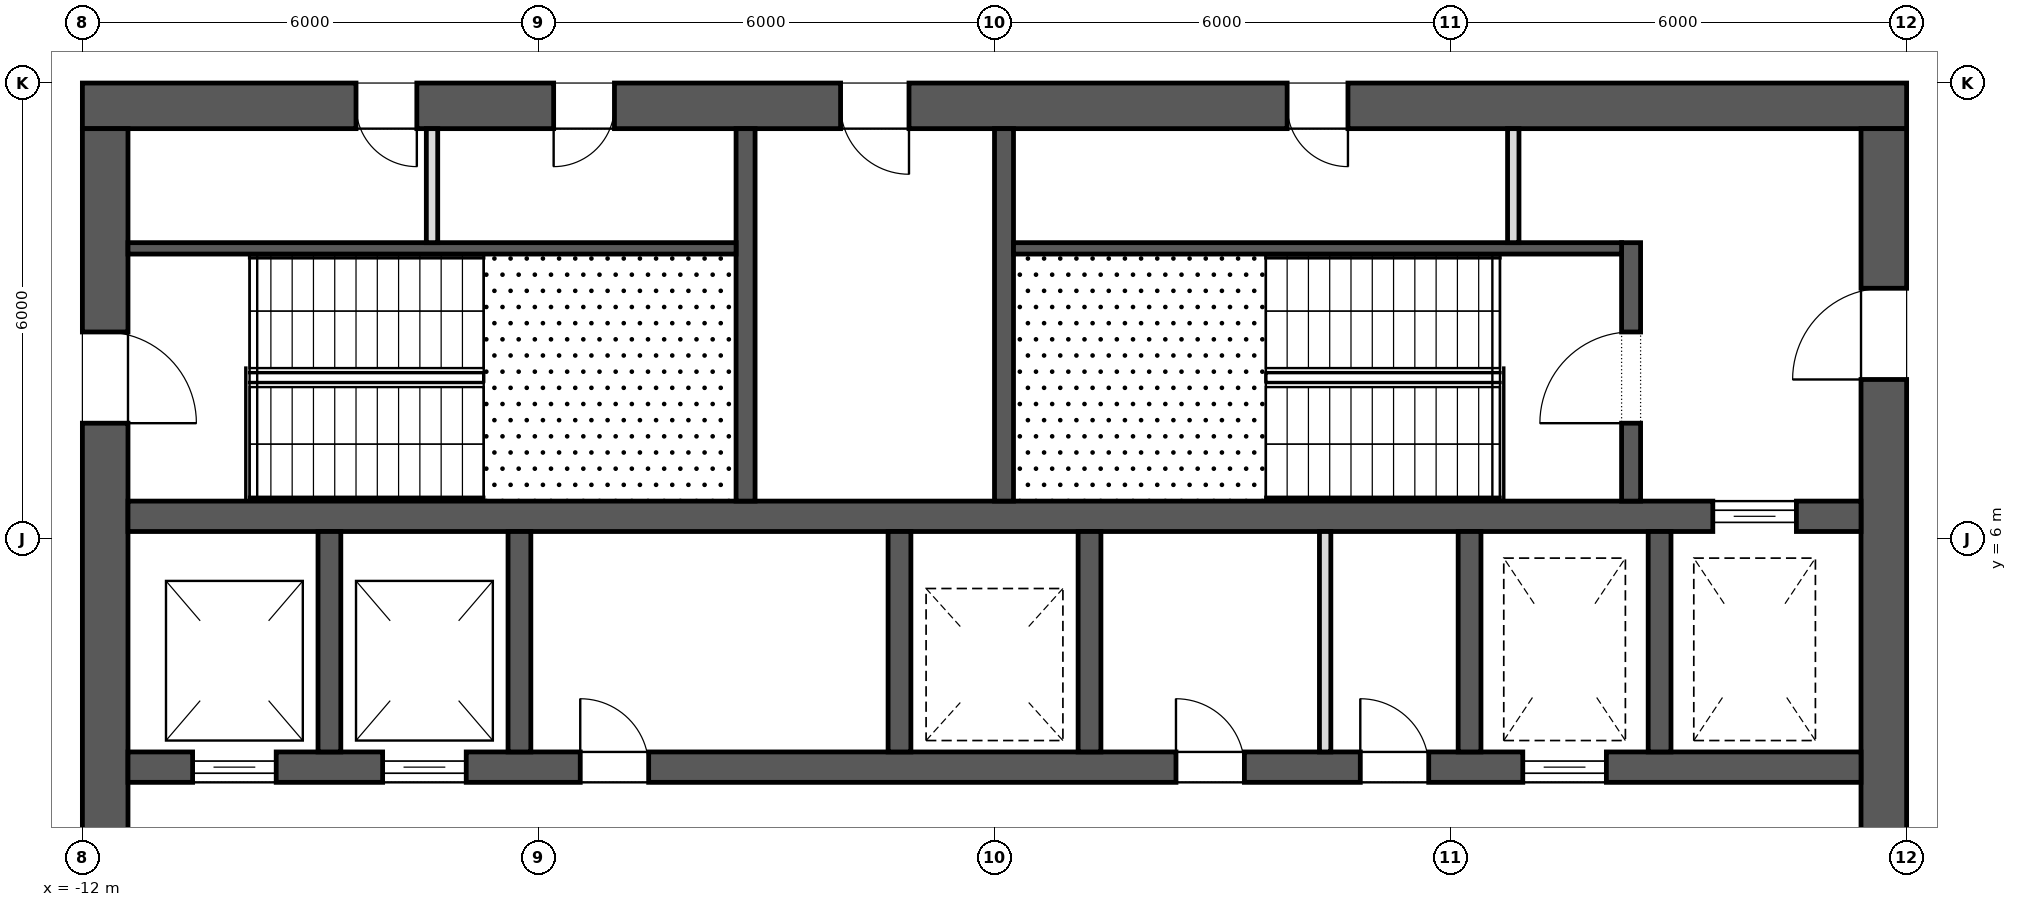
"""IFC4 building model, lengths in metres.
Left out: names, types, materials, properties, quantities, classifications, styles, units other than length and angle.
Written with IfcOpenShell. Run it as: python <this file> out.ifc"""

import sys

from ifc_helpers import new_model, si_unit, direction, frame, frame_2d, origin, place, context, subcontext, project, spatial, rectangle, extrude, element, fill, save


model = new_model("IFC4")
c1 = context("Model", 3, precision=1e-05, world=origin(), true_north=direction((0.0, 1.0)))
c2 = subcontext(c1, "Body", "Model", "MODEL_VIEW")
j1 = project(units=[si_unit("LENGTHUNIT", "METRE"), si_unit("PLANEANGLEUNIT", "RADIAN")], contexts=[c1])
p1 = place(None, origin())
s1 = spatial("IfcSite", under=j1, at=p1, CompositionType="ELEMENT")
p2 = place(p1, origin())
s2 = spatial("IfcBuilding", under=s1, at=p2, CompositionType="ELEMENT")
p3 = place(p2, frame((0.0, 0.0, 292.3)))
s3 = spatial("IfcBuildingStorey", under=s2, at=p3, CompositionType="ELEMENT", Elevation=292.3)
p4 = place(p3, frame((-12.0, 11.7, 0.0), z_axis=(0.0, 0.0, 1.0), x_axis=(1.0, 0.0, 0.0)))
e1 = element("IfcWall", 1, at=p4, inside=s3, PredefinedType="SHEAR", context=c2, shape_type="SweptSolid", body=[
    extrude(rectangle(XDim=24.0, YDim=0.6, at=frame_2d((12.0, 0.0))), origin(), (0.0, 0.0, 1.0), 4.0),
])
p5 = place(p4, frame((9.975, 0.0, 0.0)))
e2 = element("IfcOpeningElement", 2, at=p5, cuts=e1, PredefinedType="OPENING", context=c2, shape_type="SweptSolid", body=[
    extrude(rectangle(XDim=0.9, YDim=2.1, at=frame_2d((0.45, 1.05))), frame((0.0, 0.312, 0.0), z_axis=(0.0, -1.0, 0.0), x_axis=(1.0, 0.0, 0.0)), (0.0, 0.0, 1.0), 0.624),
])
p6 = place(p4, frame((3.6, 0.0, 0.0)))
e3 = element("IfcOpeningElement", 3, at=p6, cuts=e1, PredefinedType="OPENING", context=c2, shape_type="SweptSolid", body=[
    extrude(rectangle(XDim=0.8, YDim=2.1, at=frame_2d((0.4, 1.05))), frame((0.0, 0.312, 0.0), z_axis=(0.0, -1.0, 0.0), x_axis=(1.0, 0.0, 0.0)), (0.0, 0.0, 1.0), 0.624),
])
p7 = place(p4, frame((6.2, 0.0, 0.0)))
e4 = element("IfcOpeningElement", 4, at=p7, cuts=e1, PredefinedType="OPENING", context=c2, shape_type="SweptSolid", body=[
    extrude(rectangle(XDim=0.8, YDim=2.1, at=frame_2d((0.4, 1.05))), frame((0.0, 0.312, 0.0), z_axis=(0.0, -1.0, 0.0), x_axis=(1.0, 0.0, 0.0)), (0.0, 0.0, 1.0), 0.624),
])
p8 = place(p4, frame((15.85, 0.0, 0.0)))
e5 = element("IfcOpeningElement", 5, at=p8, cuts=e1, PredefinedType="OPENING", context=c2, shape_type="SweptSolid", body=[
    extrude(rectangle(XDim=0.8, YDim=2.1, at=frame_2d((0.4, 1.05))), frame((0.0, 0.312, 0.0), z_axis=(0.0, -1.0, 0.0), x_axis=(1.0, 0.0, 0.0)), (0.0, 0.0, 1.0), 0.624),
])
p9 = place(p3, frame((11.7, -11.4, 0.0), z_axis=(0.0, 0.0, 1.0), x_axis=(0.0, 1.0, 0.0)))
e6 = element("IfcWall", 6, at=p9, inside=s3, PredefinedType="SHEAR", context=c2, shape_type="SweptSolid", body=[
    extrude(rectangle(XDim=22.8, YDim=0.6, at=frame_2d((11.4, 0.0))), origin(), (0.0, 0.0, 1.0), 4.0),
])
p10 = place(p9, frame((10.2, 0.0, 0.0)))
e7 = element("IfcOpeningElement", 7, at=p10, cuts=e6, PredefinedType="OPENING", context=c2, shape_type="SweptSolid", body=[
    extrude(rectangle(XDim=2.4, YDim=2.1, at=frame_2d((1.2, 1.05))), frame((0.0, 0.312, 0.0), z_axis=(0.0, -1.0, 0.0), x_axis=(1.0, 0.0, 0.0)), (0.0, 0.0, 1.0), 0.624),
])
p11 = place(p9, frame((19.5, 0.0, 0.0)))
e8 = element("IfcOpeningElement", 8, at=p11, cuts=e6, PredefinedType="OPENING", context=c2, shape_type="SweptSolid", body=[
    extrude(rectangle(XDim=1.2, YDim=2.1, at=frame_2d((0.6, 1.05))), frame((0.0, 0.312, 0.0), z_axis=(0.0, -1.0, 0.0), x_axis=(1.0, 0.0, 0.0)), (0.0, 0.0, 1.0), 0.624),
])
p12 = place(p9, frame((2.1, 0.0, 0.0)))
e9 = element("IfcOpeningElement", 9, at=p12, cuts=e6, PredefinedType="OPENING", context=c2, shape_type="SweptSolid", body=[
    extrude(rectangle(XDim=1.2, YDim=2.1, at=frame_2d((0.6, 1.05))), frame((0.0, 0.312, 0.0), z_axis=(0.0, -1.0, 0.0), x_axis=(1.0, 0.0, 0.0)), (0.0, 0.0, 1.0), 0.624),
])
p13 = place(p3, frame((-11.7, -11.4, 0.0), z_axis=(0.0, 0.0, 1.0), x_axis=(0.0, 1.0, 0.0)))
e10 = element("IfcWall", 10, at=p13, inside=s3, PredefinedType="SHEAR", context=c2, shape_type="SweptSolid", body=[
    extrude(rectangle(XDim=22.8, YDim=0.6, at=frame_2d((11.4, 0.0))), origin(), (0.0, 0.0, 1.0), 4.0),
])
p14 = place(p13, frame((10.2, 0.0, 0.0)))
e11 = element("IfcOpeningElement", 11, at=p14, cuts=e10, PredefinedType="OPENING", context=c2, shape_type="SweptSolid", body=[
    extrude(rectangle(XDim=2.4, YDim=2.1, at=frame_2d((1.2, 1.05))), frame((0.0, 0.312, 0.0), z_axis=(0.0, -1.0, 0.0), x_axis=(1.0, 0.0, 0.0)), (0.0, 0.0, 1.0), 0.624),
])
p15 = place(p13, frame((18.925, 0.0, 0.0)))
e12 = element("IfcOpeningElement", 12, at=p15, cuts=e10, PredefinedType="OPENING", context=c2, shape_type="SweptSolid", body=[
    extrude(rectangle(XDim=1.2, YDim=2.1, at=frame_2d((0.6, 1.05))), frame((0.0, 0.312, 0.0), z_axis=(0.0, -1.0, 0.0), x_axis=(1.0, 0.0, 0.0)), (0.0, 0.0, 1.0), 0.624),
])
p16 = place(p13, frame((2.675, 0.0, 0.0)))
e13 = element("IfcOpeningElement", 13, at=p16, cuts=e10, PredefinedType="OPENING", context=c2, shape_type="SweptSolid", body=[
    extrude(rectangle(XDim=1.2, YDim=2.1, at=frame_2d((0.6, 1.05))), frame((0.0, 0.312, 0.0), z_axis=(0.0, -1.0, 0.0), x_axis=(1.0, 0.0, 0.0)), (0.0, 0.0, 1.0), 0.624),
])
p17 = place(p3, frame((-11.4, 3.0, 0.0), z_axis=(0.0, 0.0, 1.0), x_axis=(1.0, 0.0, 0.0)))
e14 = element("IfcWall", 14, at=p17, inside=s3, PredefinedType="SHEAR", context=c2, shape_type="SweptSolid", body=[
    extrude(rectangle(XDim=22.8, YDim=0.4, at=frame_2d((11.4, 0.0))), origin(), (0.0, 0.0, 1.0), 4.0),
])
p18 = place(p17, frame((0.85, 0.0, 0.0)))
e15 = element("IfcOpeningElement", 15, at=p18, cuts=e14, PredefinedType="OPENING", context=c2, shape_type="SweptSolid", body=[
    extrude(rectangle(XDim=1.1, YDim=2.1, at=frame_2d((0.55, 1.05))), frame((0.0, 0.212, 0.0), z_axis=(0.0, -1.0, 0.0), x_axis=(1.0, 0.0, 0.0)), (0.0, 0.0, 1.0), 0.424),
])
p19 = place(p17, frame((3.35, 0.0, 0.0)))
e16 = element("IfcOpeningElement", 16, at=p19, cuts=e14, PredefinedType="OPENING", context=c2, shape_type="SweptSolid", body=[
    extrude(rectangle(XDim=1.1, YDim=2.1, at=frame_2d((0.55, 1.05))), frame((0.0, 0.212, 0.0), z_axis=(0.0, -1.0, 0.0), x_axis=(1.0, 0.0, 0.0)), (0.0, 0.0, 1.0), 0.424),
])
p20 = place(p17, frame((18.35, 0.0, 0.0)))
e17 = element("IfcOpeningElement", 17, at=p20, cuts=e14, PredefinedType="OPENING", context=c2, shape_type="SweptSolid", body=[
    extrude(rectangle(XDim=1.1, YDim=2.1, at=frame_2d((0.55, 1.05))), frame((0.0, 0.212, 0.0), z_axis=(0.0, -1.0, 0.0), x_axis=(1.0, 0.0, 0.0)), (0.0, 0.0, 1.0), 0.424),
])
p21 = place(p17, frame((13.788, 0.0, 0.0)))
e18 = element("IfcOpeningElement", 18, at=p21, cuts=e14, PredefinedType="OPENING", context=c2, shape_type="SweptSolid", body=[
    extrude(rectangle(XDim=0.9, YDim=2.1, at=frame_2d((0.45, 1.05))), frame((0.0, 0.212, 0.0), z_axis=(0.0, -1.0, 0.0), x_axis=(1.0, 0.0, 0.0)), (0.0, 0.0, 1.0), 0.424),
])
p22 = place(p17, frame((16.212, 0.0, 0.0)))
e19 = element("IfcOpeningElement", 19, at=p22, cuts=e14, PredefinedType="OPENING", context=c2, shape_type="SweptSolid", body=[
    extrude(rectangle(XDim=0.9, YDim=2.1, at=frame_2d((0.45, 1.05))), frame((0.0, 0.212, 0.0), z_axis=(0.0, -1.0, 0.0), x_axis=(1.0, 0.0, 0.0)), (0.0, 0.0, 1.0), 0.424),
])
p23 = place(p17, frame((5.95, 0.0, 0.0)))
e20 = element("IfcOpeningElement", 20, at=p23, cuts=e14, PredefinedType="OPENING", context=c2, shape_type="SweptSolid", body=[
    extrude(rectangle(XDim=0.9, YDim=2.1, at=frame_2d((0.45, 1.05))), frame((0.0, 0.212, 0.0), z_axis=(0.0, -1.0, 0.0), x_axis=(1.0, 0.0, 0.0)), (0.0, 0.0, 1.0), 0.424),
])
p24 = place(p3, frame((-11.4, 6.3, 0.0), z_axis=(0.0, 0.0, 1.0), x_axis=(1.0, 0.0, 0.0)))
e21 = element("IfcWall", 21, at=p24, inside=s3, PredefinedType="SHEAR", context=c2, shape_type="SweptSolid", body=[
    extrude(rectangle(XDim=22.8, YDim=0.4, at=frame_2d((11.4, 0.0))), origin(), (0.0, 0.0, 1.0), 4.0),
])
p25 = place(p24, frame((20.85, 0.0, 0.0)))
e22 = element("IfcOpeningElement", 22, at=p25, cuts=e21, PredefinedType="OPENING", context=c2, shape_type="SweptSolid", body=[
    extrude(rectangle(XDim=1.1, YDim=2.1, at=frame_2d((0.55, 1.05))), frame((0.0, 0.212, 0.0), z_axis=(0.0, -1.0, 0.0), x_axis=(1.0, 0.0, 0.0)), (0.0, 0.0, 1.0), 0.424),
])
for number, where, z_axis, x_axis in (
    (23, (-8.75, 3.2, 0.0), (0.0, 0.0, 1.0), (0.0, 1.0, 0.0)),
    (24, (-6.25, 3.2, 0.0), (0.0, 0.0, 1.0), (0.0, 1.0, 0.0)),
    (25, (-1.25, 3.2, 0.0), (0.0, 0.0, 1.0), (0.0, 1.0, 0.0)),
    (26, (1.25, 3.2, 0.0), (0.0, 0.0, 1.0), (0.0, 1.0, 0.0)),
    (27, (6.25, 3.2, 0.0), (0.0, 0.0, 1.0), (0.0, 1.0, 0.0)),
    (28, (8.75, 3.2, 0.0), (0.0, 0.0, 1.0), (0.0, 1.0, 0.0)),
):
    element("IfcWall", number, at=place(p3, frame(where, z_axis=z_axis, x_axis=x_axis)), inside=s3, PredefinedType="SHEAR", context=c2, shape_type="SweptSolid", body=[
        extrude(rectangle(XDim=2.9, YDim=0.3, at=frame_2d((1.45, 0.0))), origin(), (0.0, 0.0, 1.0), 4.0),
    ])
for number, where, z_axis, x_axis in (
    (29, (-3.275, 6.5, 0.0), (0.0, 0.0, 1.0), (0.0, 1.0, 0.0)),
    (30, (0.125, 6.5, 0.0), (0.0, 0.0, 1.0), (0.0, 1.0, 0.0)),
):
    element("IfcWall", number, at=place(p3, frame(where, z_axis=z_axis, x_axis=x_axis)), inside=s3, PredefinedType="SHEAR", context=c2, shape_type="SweptSolid", body=[
        extrude(rectangle(XDim=4.9, YDim=0.25, at=frame_2d((2.45, 0.0))), origin(), (0.0, 0.0, 1.0), 3.7),
    ])
p26 = place(p3, frame((8.375, 6.5, 0.0), z_axis=(0.0, 0.0, 1.0), x_axis=(0.0, 1.0, 0.0)))
e31 = element("IfcWall", 31, at=p26, inside=s3, PredefinedType="SHEAR", context=c2, shape_type="SweptSolid", body=[
    extrude(rectangle(XDim=3.4, YDim=0.25, at=frame_2d((1.7, 0.0))), origin(), (0.0, 0.0, 1.0), 3.7),
])
p27 = place(p26, frame((1.025, 0.0, 0.0)))
e32 = element("IfcOpeningElement", 32, at=p27, cuts=e31, PredefinedType="OPENING", context=c2, shape_type="SweptSolid", body=[
    extrude(rectangle(XDim=1.2, YDim=2.1, at=frame_2d((0.6, 1.05))), frame((0.0, 0.137, 0.0), z_axis=(0.0, -1.0, 0.0), x_axis=(1.0, 0.0, 0.0)), (0.0, 0.0, 1.0), 0.274),
])
for number, where, z_axis, x_axis in (
    (33, (-11.4, 9.825, 0.0), (0.0, 0.0, 1.0), (1.0, 0.0, 0.0)),
    (34, (0.25, 9.825, 0.0), (0.0, 0.0, 1.0), (1.0, 0.0, 0.0)),
):
    element("IfcWall", number, at=place(p3, frame(where, z_axis=z_axis, x_axis=x_axis)), inside=s3, PredefinedType="SHEAR", context=c2, shape_type="SweptSolid", body=[
        extrude(rectangle(XDim=8.0, YDim=0.15, at=frame_2d((4.0, 0.0))), origin(), (0.0, 0.0, 1.0), 3.7),
    ])
for number, where, z_axis, x_axis in (
    (35, (-7.4, 9.9, 0.0), (0.0, 0.0, 1.0), (0.0, 1.0, 0.0)),
    (36, (6.825, 9.9, 0.0), (0.0, 0.0, 1.0), (0.0, 1.0, 0.0)),
):
    element("IfcWall", number, at=place(p3, frame(where, z_axis=z_axis, x_axis=x_axis)), inside=s3, PredefinedType="PARTITIONING", context=c2, shape_type="SweptSolid", body=[
        extrude(rectangle(XDim=1.5, YDim=0.15, at=frame_2d((0.75, 0.0))), origin(), (0.0, 0.0, 1.0), 3.7),
    ])
p28 = place(p3, frame((4.35, 3.2, 0.0), z_axis=(0.0, 0.0, 1.0), x_axis=(0.0, 1.0, 0.0)))
e37 = element("IfcWall", 37, at=p28, inside=s3, PredefinedType="PARTITIONING", context=c2, shape_type="SweptSolid", body=[
    extrude(rectangle(XDim=2.9, YDim=0.15, at=frame_2d((1.45, 0.0))), origin(), (0.0, 0.0, 1.0), 3.7),
])
p29 = place(p25, origin())
e38 = element("IfcDoor", 38, at=p29, inside=s3, OperationType="SLIDING_TO_LEFT", PredefinedType="DOOR", context=c2, shape_type="SweptSolid", body=[
    extrude(rectangle(XDim=1.1, YDim=2.1, at=frame_2d((0.55, 1.05))), frame((0.0, 0.025, 0.0), z_axis=(0.0, -1.0, 0.0), x_axis=(1.0, 0.0, 0.0)), (0.0, 0.0, 1.0), 0.05),
])
fill(e22, e38)
p30 = place(p18, origin())
e39 = element("IfcDoor", 39, at=p30, inside=s3, OperationType="SLIDING_TO_LEFT", PredefinedType="DOOR", context=c2, shape_type="SweptSolid", body=[
    extrude(rectangle(XDim=1.1, YDim=2.1, at=frame_2d((0.55, 1.05))), frame((0.0, 0.025, 0.0), z_axis=(0.0, -1.0, 0.0), x_axis=(1.0, 0.0, 0.0)), (0.0, 0.0, 1.0), 0.05),
])
fill(e15, e39)
p31 = place(p19, origin())
e40 = element("IfcDoor", 40, at=p31, inside=s3, OperationType="SLIDING_TO_LEFT", PredefinedType="DOOR", context=c2, shape_type="SweptSolid", body=[
    extrude(rectangle(XDim=1.1, YDim=2.1, at=frame_2d((0.55, 1.05))), frame((0.0, 0.025, 0.0), z_axis=(0.0, -1.0, 0.0), x_axis=(1.0, 0.0, 0.0)), (0.0, 0.0, 1.0), 0.05),
])
fill(e16, e40)
p32 = place(p20, origin())
e41 = element("IfcDoor", 41, at=p32, inside=s3, OperationType="SLIDING_TO_LEFT", PredefinedType="DOOR", context=c2, shape_type="SweptSolid", body=[
    extrude(rectangle(XDim=1.1, YDim=2.1, at=frame_2d((0.55, 1.05))), frame((0.0, 0.025, 0.0), z_axis=(0.0, -1.0, 0.0), x_axis=(1.0, 0.0, 0.0)), (0.0, 0.0, 1.0), 0.05),
])
fill(e17, e41)
p33 = place(p15, frame((1.2, 0.0, 0.0), z_axis=(0.0, 0.0, 1.0), x_axis=(-1.0, 0.0, 0.0)))
e42 = element("IfcDoor", 42, at=p33, inside=s3, OperationType="SINGLE_SWING_LEFT", PredefinedType="DOOR", context=c2, shape_type="SweptSolid", body=[
    extrude(rectangle(XDim=1.2, YDim=2.1, at=frame_2d((0.6, 1.05))), frame((0.0, 0.025, 0.0), z_axis=(0.0, -1.0, 0.0), x_axis=(1.0, 0.0, 0.0)), (0.0, 0.0, 1.0), 0.05),
])
fill(e12, e42)
p34 = place(p27, origin())
e43 = element("IfcDoor", 43, at=p34, inside=s3, OperationType="SINGLE_SWING_RIGHT", PredefinedType="DOOR", context=c2, shape_type="SweptSolid", body=[
    extrude(rectangle(XDim=1.2, YDim=2.1, at=frame_2d((0.6, 1.05))), frame((0.0, 0.025, 0.0), z_axis=(0.0, -1.0, 0.0), x_axis=(1.0, 0.0, 0.0)), (0.0, 0.0, 1.0), 0.05),
])
fill(e32, e43)
p35 = place(p11, origin())
e44 = element("IfcDoor", 44, at=p35, inside=s3, OperationType="SINGLE_SWING_RIGHT", PredefinedType="DOOR", context=c2, shape_type="SweptSolid", body=[
    extrude(rectangle(XDim=1.2, YDim=2.1, at=frame_2d((0.6, 1.05))), frame((0.0, 0.025, 0.0), z_axis=(0.0, -1.0, 0.0), x_axis=(1.0, 0.0, 0.0)), (0.0, 0.0, 1.0), 0.05),
])
fill(e8, e44)
p36 = place(p5, frame((0.9, 0.0, 0.0), z_axis=(0.0, 0.0, 1.0), x_axis=(-1.0, 0.0, 0.0)))
e45 = element("IfcDoor", 45, at=p36, inside=s3, OperationType="SINGLE_SWING_RIGHT", PredefinedType="DOOR", context=c2, shape_type="SweptSolid", body=[
    extrude(rectangle(XDim=0.9, YDim=2.1, at=frame_2d((0.45, 1.05))), frame((0.0, 0.025, 0.0), z_axis=(0.0, -1.0, 0.0), x_axis=(1.0, 0.0, 0.0)), (0.0, 0.0, 1.0), 0.05),
])
fill(e2, e45)
p37 = place(p6, frame((0.8, 0.0, 0.0), z_axis=(0.0, 0.0, 1.0), x_axis=(-1.0, 0.0, 0.0)))
e46 = element("IfcDoor", 46, at=p37, inside=s3, OperationType="SINGLE_SWING_RIGHT", PredefinedType="DOOR", context=c2, shape_type="SweptSolid", body=[
    extrude(rectangle(XDim=0.8, YDim=2.1, at=frame_2d((0.4, 1.05))), frame((0.0, 0.025, 0.0), z_axis=(0.0, -1.0, 0.0), x_axis=(1.0, 0.0, 0.0)), (0.0, 0.0, 1.0), 0.05),
])
fill(e3, e46)
p38 = place(p7, frame((0.8, 0.0, 0.0), z_axis=(0.0, 0.0, 1.0), x_axis=(-1.0, 0.0, 0.0)))
e47 = element("IfcDoor", 47, at=p38, inside=s3, OperationType="SINGLE_SWING_LEFT", PredefinedType="DOOR", context=c2, shape_type="SweptSolid", body=[
    extrude(rectangle(XDim=0.8, YDim=2.1, at=frame_2d((0.4, 1.05))), frame((0.0, 0.025, 0.0), z_axis=(0.0, -1.0, 0.0), x_axis=(1.0, 0.0, 0.0)), (0.0, 0.0, 1.0), 0.05),
])
fill(e4, e47)
p39 = place(p8, frame((0.8, 0.0, 0.0), z_axis=(0.0, 0.0, 1.0), x_axis=(-1.0, 0.0, 0.0)))
e48 = element("IfcDoor", 48, at=p39, inside=s3, OperationType="SINGLE_SWING_RIGHT", PredefinedType="DOOR", context=c2, shape_type="SweptSolid", body=[
    extrude(rectangle(XDim=0.8, YDim=2.1, at=frame_2d((0.4, 1.05))), frame((0.0, 0.025, 0.0), z_axis=(0.0, -1.0, 0.0), x_axis=(1.0, 0.0, 0.0)), (0.0, 0.0, 1.0), 0.05),
])
fill(e5, e48)
p40 = place(p21, origin())
e49 = element("IfcDoor", 49, at=p40, inside=s3, OperationType="SINGLE_SWING_RIGHT", PredefinedType="DOOR", context=c2, shape_type="SweptSolid", body=[
    extrude(rectangle(XDim=0.9, YDim=2.1, at=frame_2d((0.45, 1.05))), frame((0.0, 0.025, 0.0), z_axis=(0.0, -1.0, 0.0), x_axis=(1.0, 0.0, 0.0)), (0.0, 0.0, 1.0), 0.05),
])
fill(e18, e49)
p41 = place(p22, origin())
e50 = element("IfcDoor", 50, at=p41, inside=s3, OperationType="SINGLE_SWING_RIGHT", PredefinedType="DOOR", context=c2, shape_type="SweptSolid", body=[
    extrude(rectangle(XDim=0.9, YDim=2.1, at=frame_2d((0.45, 1.05))), frame((0.0, 0.025, 0.0), z_axis=(0.0, -1.0, 0.0), x_axis=(1.0, 0.0, 0.0)), (0.0, 0.0, 1.0), 0.05),
])
fill(e19, e50)
p42 = place(p23, origin())
e51 = element("IfcDoor", 51, at=p42, inside=s3, OperationType="SINGLE_SWING_RIGHT", PredefinedType="DOOR", context=c2, shape_type="SweptSolid", body=[
    extrude(rectangle(XDim=0.9, YDim=2.1, at=frame_2d((0.45, 1.05))), frame((0.0, 0.025, 0.0), z_axis=(0.0, -1.0, 0.0), x_axis=(1.0, 0.0, 0.0)), (0.0, 0.0, 1.0), 0.05),
])
fill(e20, e51)
save(model, sys.argv[1])
